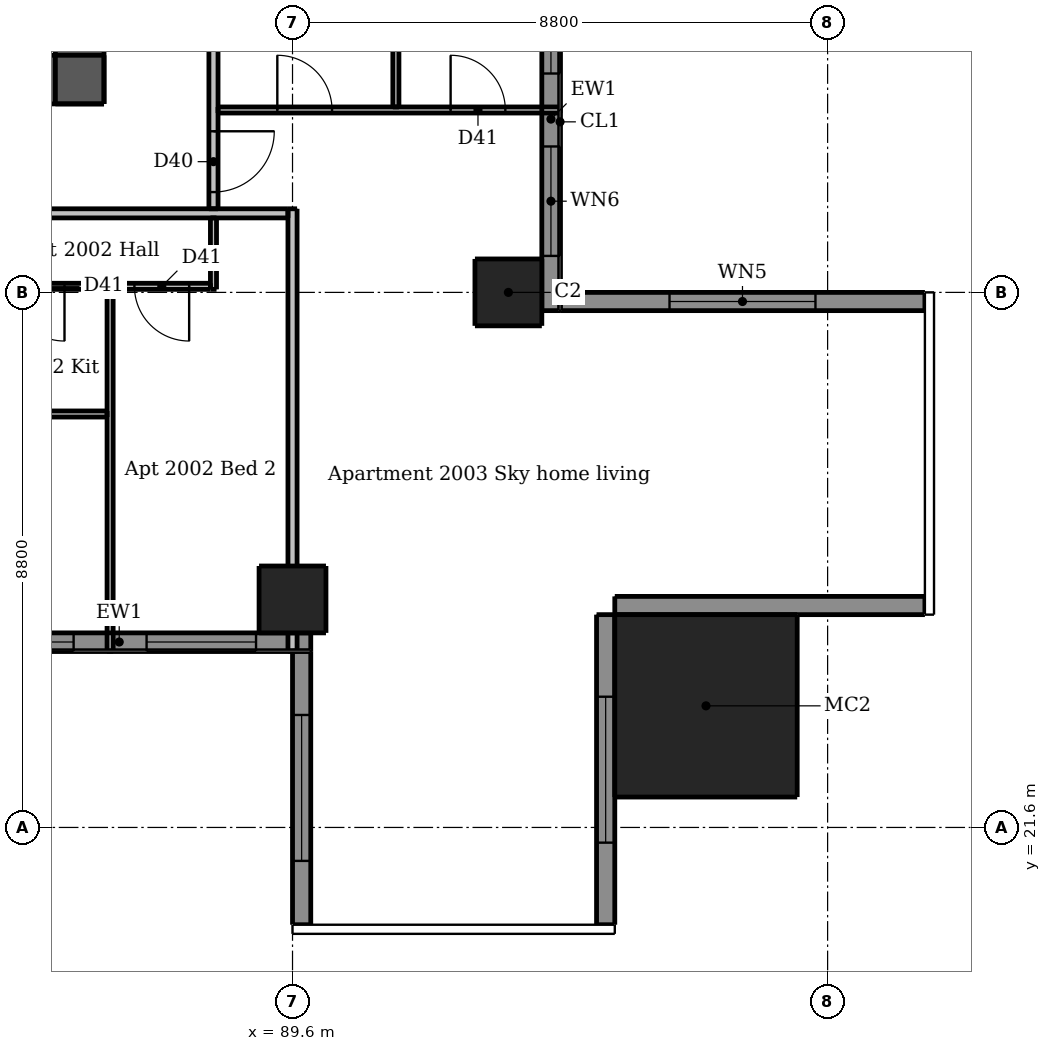
"""IFC4 building model, lengths in metres.
Left out: names, types, materials, properties, quantities, classifications, styles, units other than length and angle.
Written with IfcOpenShell. Run it as: python <this file> out.ifc"""

import sys

from ifc_helpers import new_model, si_unit, direction, frame, frame_2d, origin, origin_2d, place, context, subcontext, project, spatial, rectangle, extrude, element, fill, save


model = new_model("IFC4")
c1 = context("Model", 3, precision=1e-05, world=origin(), true_north=direction((0.0, 1.0)))
c2 = subcontext(c1, "Body", "Model", "MODEL_VIEW")
j1 = project(units=[si_unit("LENGTHUNIT", "METRE"), si_unit("PLANEANGLEUNIT", "RADIAN")], contexts=[c1])
p1 = place(None, origin())
s1 = spatial("IfcSite", under=j1, at=p1, CompositionType="ELEMENT")
p2 = place(p1, origin())
s2 = spatial("IfcBuilding", under=s1, at=p2, CompositionType="ELEMENT")
p3 = place(p2, frame((0.0, 0.0, 78.7)))
s3 = spatial("IfcBuildingStorey", under=s2, at=p3, CompositionType="ELEMENT", Elevation=78.7)
p4 = place(p3, frame((62.5, 33.9, 0.0), z_axis=(0.0, 0.0, 1.0), x_axis=(1.0, 0.0, 0.0)))
e1 = element("IfcWall", 1, at=p4, inside=s3, PredefinedType="SHEAR", context=c2, shape_type="SweptSolid", body=[
    extrude(rectangle(XDim=24.0, YDim=0.8, at=frame_2d((12.0, 0.0))), origin(), (0.0, 0.0, 1.0), 3.05),
])
p5 = place(p4, frame((2.0, 0.0, 0.0)))
e2 = element("IfcOpeningElement", 2, at=p5, cuts=e1, PredefinedType="OPENING", context=c2, shape_type="SweptSolid", body=[
    extrude(rectangle(XDim=1.1, YDim=2.1, at=frame_2d((0.55, 1.05))), frame((0.0, 0.41, 0.0), z_axis=(0.0, -1.0, 0.0), x_axis=(1.0, 0.0, 0.0)), (0.0, 0.0, 1.0), 0.82),
])
p6 = place(p4, frame((20.9, 0.0, 0.0)))
e3 = element("IfcOpeningElement", 3, at=p6, cuts=e1, PredefinedType="OPENING", context=c2, shape_type="SweptSolid", body=[
    extrude(rectangle(XDim=1.1, YDim=2.1, at=frame_2d((0.55, 1.05))), frame((0.0, 0.41, 0.0), z_axis=(0.0, -1.0, 0.0), x_axis=(1.0, 0.0, 0.0)), (0.0, 0.0, 1.0), 0.82),
])
p7 = place(p4, frame((8.0, 0.0, 0.0)))
e4 = element("IfcOpeningElement", 4, at=p7, cuts=e1, PredefinedType="OPENING", context=c2, shape_type="SweptSolid", body=[
    extrude(rectangle(XDim=1.1, YDim=2.1, at=frame_2d((0.55, 1.05))), frame((0.0, 0.41, 0.0), z_axis=(0.0, -1.0, 0.0), x_axis=(1.0, 0.0, 0.0)), (0.0, 0.0, 1.0), 0.82),
])
p8 = place(p4, frame((17.488, 0.0, 0.0)))
e5 = element("IfcOpeningElement", 5, at=p8, cuts=e1, PredefinedType="OPENING", context=c2, shape_type="SweptSolid", body=[
    extrude(rectangle(XDim=0.9, YDim=2.1, at=frame_2d((0.45, 1.05))), frame((0.0, 0.41, 0.0), z_axis=(0.0, -1.0, 0.0), x_axis=(1.0, 0.0, 0.0)), (0.0, 0.0, 1.0), 0.82),
])
p9 = place(p3, frame((86.1, 33.5, 0.0), z_axis=(0.0, 0.0, 1.0), x_axis=(0.0, 1.0, 0.0)))
e6 = element("IfcWall", 6, at=p9, inside=s3, PredefinedType="SHEAR", context=c2, shape_type="SweptSolid", body=[
    extrude(rectangle(XDim=24.0, YDim=0.8, at=frame_2d((12.0, 0.0))), origin(), (0.0, 0.0, 1.0), 3.05),
])
p10 = place(p9, frame((11.2, 0.0, 0.0)))
e7 = element("IfcOpeningElement", 7, at=p10, cuts=e6, PredefinedType="OPENING", context=c2, shape_type="SweptSolid", body=[
    extrude(rectangle(XDim=1.6, YDim=2.1, at=frame_2d((0.8, 1.05))), frame((0.0, 0.41, 0.0), z_axis=(0.0, -1.0, 0.0), x_axis=(1.0, 0.0, 0.0)), (0.0, 0.0, 1.0), 0.82),
])
for number, where, z_axis, x_axis in (
    (8, (89.6, 25.35, 0.0), (0.0, 0.0, 1.0), (1.0, 0.0, 0.0)),
    (9, (93.15, 30.4, 0.0), (0.0, 0.0, 1.0), (1.0, 0.0, 0.0)),
):
    element("IfcColumn", number, at=place(p3, frame(where, z_axis=z_axis, x_axis=x_axis)), inside=s3, PredefinedType="COLUMN", context=c2, shape_type="SweptSolid", body=[
        extrude(rectangle(XDim=1.1, YDim=1.1, at=origin_2d()), origin(), (0.0, 0.0, 1.0), 3.05),
    ])
p11 = place(p3, frame((96.4, 23.6, 0.0), z_axis=(0.0, 0.0, 1.0), x_axis=(1.0, 0.0, 0.0)))
e10 = element("IfcColumn", 10, at=p11, inside=s3, PredefinedType="COLUMN", context=c2, shape_type="SweptSolid", body=[
    extrude(rectangle(XDim=3.0, YDim=3.0, at=origin_2d()), origin(), (0.0, 0.0, 1.0), 3.3),
])
p12 = place(p3, frame((89.75, 24.5, 0.0), z_axis=(0.0, 0.0, 1.0), x_axis=(0.0, -1.0, 0.0)))
e11 = element("IfcWall", 11, at=p12, inside=s3, PredefinedType="SOLIDWALL", context=c2, shape_type="SweptSolid", body=[
    extrude(rectangle(XDim=4.5, YDim=0.3, at=frame_2d((2.25, 0.0))), origin(), (0.0, 0.0, 1.0), 3.05),
])
p13 = place(p12, frame((1.05, 0.0, 0.15)))
e12 = element("IfcOpeningElement", 12, at=p13, cuts=e11, PredefinedType="OPENING", context=c2, shape_type="SweptSolid", body=[
    extrude(rectangle(XDim=2.4, YDim=2.1, at=frame_2d((1.2, 1.05))), frame((0.0, 0.16, 0.0), z_axis=(0.0, -1.0, 0.0), x_axis=(1.0, 0.0, 0.0)), (0.0, 0.0, 1.0), 0.32),
])
p14 = place(p3, frame((94.75, 20.0, 0.0), z_axis=(0.0, 0.0, 1.0), x_axis=(0.0, 1.0, 0.0)))
e13 = element("IfcWall", 13, at=p14, inside=s3, PredefinedType="SOLIDWALL", context=c2, shape_type="SweptSolid", body=[
    extrude(rectangle(XDim=5.1, YDim=0.3, at=frame_2d((2.55, 0.0))), origin(), (0.0, 0.0, 1.0), 3.05),
])
p15 = place(p14, frame((1.35, 0.0, 0.15)))
e14 = element("IfcOpeningElement", 14, at=p15, cuts=e13, PredefinedType="OPENING", context=c2, shape_type="SweptSolid", body=[
    extrude(rectangle(XDim=2.4, YDim=2.1, at=frame_2d((1.2, 1.05))), frame((0.0, 0.16, 0.0), z_axis=(0.0, -1.0, 0.0), x_axis=(1.0, 0.0, 0.0)), (0.0, 0.0, 1.0), 0.32),
])
p16 = place(p3, frame((94.9, 25.25, 0.0), z_axis=(0.0, 0.0, 1.0), x_axis=(1.0, 0.0, 0.0)))
e15 = element("IfcWall", 15, at=p16, inside=s3, PredefinedType="SOLIDWALL", context=c2, shape_type="SweptSolid", body=[
    extrude(rectangle(XDim=5.1, YDim=0.3, at=frame_2d((2.55, 0.0))), origin(), (0.0, 0.0, 1.0), 3.05),
])
p17 = place(p3, frame((100.0, 30.25, 0.0), z_axis=(0.0, 0.0, 1.0), x_axis=(-1.0, 0.0, 0.0)))
e16 = element("IfcWall", 16, at=p17, inside=s3, PredefinedType="SOLIDWALL", context=c2, shape_type="SweptSolid", body=[
    extrude(rectangle(XDim=6.0, YDim=0.3, at=frame_2d((3.0, 0.0))), origin(), (0.0, 0.0, 1.0), 3.05),
])
p18 = place(p17, frame((1.8, 0.0, 0.15)))
e17 = element("IfcOpeningElement", 17, at=p18, cuts=e16, PredefinedType="OPENING", context=c2, shape_type="SweptSolid", body=[
    extrude(rectangle(XDim=2.4, YDim=2.1, at=frame_2d((1.2, 1.05))), frame((0.0, 0.16, 0.0), z_axis=(0.0, -1.0, 0.0), x_axis=(1.0, 0.0, 0.0)), (0.0, 0.0, 1.0), 0.32),
])
p19 = place(p3, frame((83.6, 24.65, 0.0), z_axis=(0.0, 0.0, 1.0), x_axis=(1.0, 0.0, 0.0)))
e18 = element("IfcWall", 18, at=p19, inside=s3, PredefinedType="SOLIDWALL", context=c2, shape_type="SweptSolid", body=[
    extrude(rectangle(XDim=6.3, YDim=0.3, at=frame_2d((3.15, 0.0))), origin(), (0.0, 0.0, 1.0), 3.05),
])
p20 = place(p19, frame((0.6, 0.0, 0.15)))
e19 = element("IfcOpeningElement", 19, at=p20, cuts=e18, PredefinedType="OPENING", context=c2, shape_type="SweptSolid", body=[
    extrude(rectangle(XDim=1.8, YDim=2.1, at=frame_2d((0.9, 1.05))), frame((0.0, 0.16, 0.0), z_axis=(0.0, -1.0, 0.0), x_axis=(1.0, 0.0, 0.0)), (0.0, 0.0, 1.0), 0.32),
])
p21 = place(p19, frame((3.6, 0.0, 0.15)))
e20 = element("IfcOpeningElement", 20, at=p21, cuts=e18, PredefinedType="OPENING", context=c2, shape_type="SweptSolid", body=[
    extrude(rectangle(XDim=1.8, YDim=2.1, at=frame_2d((0.9, 1.05))), frame((0.0, 0.16, 0.0), z_axis=(0.0, -1.0, 0.0), x_axis=(1.0, 0.0, 0.0)), (0.0, 0.0, 1.0), 0.32),
])
p22 = place(p3, frame((93.85, 30.1, 0.0), z_axis=(0.0, 0.0, 1.0), x_axis=(0.0, 1.0, 0.0)))
e21 = element("IfcWall", 21, at=p22, inside=s3, PredefinedType="SOLIDWALL", context=c2, shape_type="SweptSolid", body=[
    extrude(rectangle(XDim=6.3, YDim=0.3, at=frame_2d((3.15, 0.0))), origin(), (0.0, 0.0, 1.0), 3.05),
])
p23 = place(p22, frame((0.9, 0.0, 0.15)))
e22 = element("IfcOpeningElement", 22, at=p23, cuts=e21, PredefinedType="OPENING", context=c2, shape_type="SweptSolid", body=[
    extrude(rectangle(XDim=1.8, YDim=2.1, at=frame_2d((0.9, 1.05))), frame((0.0, 0.16, 0.0), z_axis=(0.0, -1.0, 0.0), x_axis=(1.0, 0.0, 0.0)), (0.0, 0.0, 1.0), 0.32),
])
p24 = place(p22, frame((3.9, 0.0, 0.15)))
e23 = element("IfcOpeningElement", 23, at=p24, cuts=e21, PredefinedType="OPENING", context=c2, shape_type="SweptSolid", body=[
    extrude(rectangle(XDim=1.8, YDim=2.1, at=frame_2d((0.9, 1.05))), frame((0.0, 0.16, 0.0), z_axis=(0.0, -1.0, 0.0), x_axis=(1.0, 0.0, 0.0)), (0.0, 0.0, 1.0), 0.32),
])
p25 = place(p3, frame((86.6, 24.5, 0.0), z_axis=(0.0, 0.0, 1.0), x_axis=(0.0, 1.0, 0.0)))
e24 = element("IfcWall", 24, at=p25, inside=s3, PredefinedType="PARTITIONING", context=c2, shape_type="SweptSolid", body=[
    extrude(rectangle(XDim=5.95, YDim=0.1, at=frame_2d((2.975, 0.0))), origin(), (0.0, 0.0, 1.0), 3.05),
])
p26 = place(p3, frame((88.3, 30.45, 0.0), z_axis=(0.0, 0.0, 1.0), x_axis=(0.0, 1.0, 0.0)))
e25 = element("IfcWall", 25, at=p26, inside=s3, PredefinedType="PARTITIONING", context=c2, shape_type="SweptSolid", body=[
    extrude(rectangle(XDim=1.175, YDim=0.1, at=frame_2d((0.587, 0.0))), origin(), (0.0, 0.0, 1.0), 3.05),
])
p27 = place(p3, frame((91.3, 33.45, 0.0), z_axis=(0.0, 0.0, 1.0), x_axis=(0.0, 1.0, 0.0)))
e26 = element("IfcWall", 26, at=p27, inside=s3, PredefinedType="PARTITIONING", context=c2, shape_type="SweptSolid", body=[
    extrude(rectangle(XDim=5.975, YDim=0.1, at=frame_2d((2.988, 0.0))), origin(), (0.0, 0.0, 1.0), 3.05),
])
p28 = place(p27, frame((3.8, 0.0, 0.0)))
e27 = element("IfcOpeningElement", 27, at=p28, cuts=e26, PredefinedType="OPENING", context=c2, shape_type="SweptSolid", body=[
    extrude(rectangle(XDim=0.8, YDim=2.1, at=frame_2d((0.4, 1.05))), frame((0.0, 0.06, 0.0), z_axis=(0.0, -1.0, 0.0), x_axis=(1.0, 0.0, 0.0)), (0.0, 0.0, 1.0), 0.12),
])
p29 = place(p3, frame((88.375, 33.4, 0.0), z_axis=(0.0, 0.0, 1.0), x_axis=(1.0, 0.0, 0.0)))
e28 = element("IfcWall", 28, at=p29, inside=s3, PredefinedType="PARTITIONING", context=c2, shape_type="SweptSolid", body=[
    extrude(rectangle(XDim=5.625, YDim=0.1, at=frame_2d((2.812, 0.0))), origin(), (0.0, 0.0, 1.0), 3.05),
])
p30 = place(p29, frame((0.975, 0.0, 0.0)))
e29 = element("IfcOpeningElement", 29, at=p30, cuts=e28, PredefinedType="OPENING", context=c2, shape_type="SweptSolid", body=[
    extrude(rectangle(XDim=0.9, YDim=2.1, at=frame_2d((0.45, 1.05))), frame((0.0, 0.06, 0.0), z_axis=(0.0, -1.0, 0.0), x_axis=(1.0, 0.0, 0.0)), (0.0, 0.0, 1.0), 0.12),
])
p31 = place(p29, frame((3.825, 0.0, 0.0)))
e30 = element("IfcOpeningElement", 30, at=p31, cuts=e28, PredefinedType="OPENING", context=c2, shape_type="SweptSolid", body=[
    extrude(rectangle(XDim=0.9, YDim=2.1, at=frame_2d((0.45, 1.05))), frame((0.0, 0.06, 0.0), z_axis=(0.0, -1.0, 0.0), x_axis=(1.0, 0.0, 0.0)), (0.0, 0.0, 1.0), 0.12),
])
p32 = place(p3, frame((88.25, 30.5, 0.0), z_axis=(0.0, 0.0, 1.0), x_axis=(-1.0, 0.0, 0.0)))
e31 = element("IfcWall", 31, at=p32, inside=s3, PredefinedType="PARTITIONING", context=c2, shape_type="SweptSolid", body=[
    extrude(rectangle(XDim=13.475, YDim=0.1, at=frame_2d((6.738, 0.0))), origin(), (0.0, 0.0, 1.0), 3.05),
])
p33 = place(p32, frame((6.3, 0.0, 0.0)))
e32 = element("IfcOpeningElement", 32, at=p33, cuts=e31, PredefinedType="OPENING", context=c2, shape_type="SweptSolid", body=[
    extrude(rectangle(XDim=0.9, YDim=2.1, at=frame_2d((0.45, 1.05))), frame((0.0, 0.06, 0.0), z_axis=(0.0, -1.0, 0.0), x_axis=(1.0, 0.0, 0.0)), (0.0, 0.0, 1.0), 0.12),
])
p34 = place(p32, frame((2.4, 0.0, 0.0)))
e33 = element("IfcOpeningElement", 33, at=p34, cuts=e31, PredefinedType="OPENING", context=c2, shape_type="SweptSolid", body=[
    extrude(rectangle(XDim=0.9, YDim=2.1, at=frame_2d((0.45, 1.05))), frame((0.0, 0.06, 0.0), z_axis=(0.0, -1.0, 0.0), x_axis=(1.0, 0.0, 0.0)), (0.0, 0.0, 1.0), 0.12),
])
p35 = place(p32, frame((4.5, 0.0, 0.0)))
e34 = element("IfcOpeningElement", 34, at=p35, cuts=e31, PredefinedType="OPENING", context=c2, shape_type="SweptSolid", body=[
    extrude(rectangle(XDim=0.9, YDim=2.1, at=frame_2d((0.45, 1.05))), frame((0.0, 0.06, 0.0), z_axis=(0.0, -1.0, 0.0), x_axis=(1.0, 0.0, 0.0)), (0.0, 0.0, 1.0), 0.12),
])
p36 = place(p32, frame((11.35, 0.0, 0.0)))
e35 = element("IfcOpeningElement", 35, at=p36, cuts=e31, PredefinedType="OPENING", context=c2, shape_type="SweptSolid", body=[
    extrude(rectangle(XDim=0.9, YDim=2.1, at=frame_2d((0.45, 1.05))), frame((0.0, 0.06, 0.0), z_axis=(0.0, -1.0, 0.0), x_axis=(1.0, 0.0, 0.0)), (0.0, 0.0, 1.0), 0.12),
])
p37 = place(p32, frame((0.35, 0.0, 0.0)))
e36 = element("IfcOpeningElement", 36, at=p37, cuts=e31, PredefinedType="OPENING", context=c2, shape_type="SweptSolid", body=[
    extrude(rectangle(XDim=0.9, YDim=2.1, at=frame_2d((0.45, 1.05))), frame((0.0, 0.06, 0.0), z_axis=(0.0, -1.0, 0.0), x_axis=(1.0, 0.0, 0.0)), (0.0, 0.0, 1.0), 0.12),
])
p38 = place(p32, frame((8.45, 0.0, 0.0)))
e37 = element("IfcOpeningElement", 37, at=p38, cuts=e31, PredefinedType="OPENING", context=c2, shape_type="SweptSolid", body=[
    extrude(rectangle(XDim=0.8, YDim=2.1, at=frame_2d((0.4, 1.05))), frame((0.0, 0.06, 0.0), z_axis=(0.0, -1.0, 0.0), x_axis=(1.0, 0.0, 0.0)), (0.0, 0.0, 1.0), 0.12),
])
p39 = place(p3, frame((82.45, 28.4, 0.0), z_axis=(0.0, 0.0, 1.0), x_axis=(1.0, 0.0, 0.0)))
e38 = element("IfcWall", 38, at=p39, inside=s3, PredefinedType="PARTITIONING", context=c2, shape_type="SweptSolid", body=[
    extrude(rectangle(XDim=4.1, YDim=0.1, at=frame_2d((2.05, 0.0))), origin(), (0.0, 0.0, 1.0), 3.05),
])
p40 = place(p3, frame((88.3, 60.475, 0.0), z_axis=(0.0, 0.0, 1.0), x_axis=(0.0, -1.0, 0.0)))
e39 = element("IfcWall", 39, at=p40, inside=s3, PredefinedType="PARTITIONING", context=c2, shape_type="SweptSolid", body=[
    extrude(rectangle(XDim=28.7, YDim=0.15, at=frame_2d((14.35, 0.0))), origin(), (0.0, 0.0, 1.0), 3.05),
])
p41 = place(p40, frame((27.425, 0.0, 0.0)))
e40 = element("IfcOpeningElement", 40, at=p41, cuts=e39, PredefinedType="OPENING", context=c2, shape_type="SweptSolid", body=[
    extrude(rectangle(XDim=1.0, YDim=2.1, at=frame_2d((0.5, 1.05))), frame((0.0, 0.085, 0.0), z_axis=(0.0, -1.0, 0.0), x_axis=(1.0, 0.0, 0.0)), (0.0, 0.0, 1.0), 0.17),
])
p42 = place(p40, frame((10.575, 0.0, 0.0)))
e41 = element("IfcOpeningElement", 41, at=p42, cuts=e39, PredefinedType="OPENING", context=c2, shape_type="SweptSolid", body=[
    extrude(rectangle(XDim=1.0, YDim=2.1, at=frame_2d((0.5, 1.05))), frame((0.0, 0.085, 0.0), z_axis=(0.0, -1.0, 0.0), x_axis=(1.0, 0.0, 0.0)), (0.0, 0.0, 1.0), 0.17),
])
p43 = place(p3, frame((89.6, 24.5, 0.0), z_axis=(0.0, 0.0, 1.0), x_axis=(0.0, 1.0, 0.0)))
e42 = element("IfcWall", 42, at=p43, inside=s3, PredefinedType="PARTITIONING", context=c2, shape_type="SweptSolid", body=[
    extrude(rectangle(XDim=7.275, YDim=0.15, at=frame_2d((3.637, 0.0))), origin(), (0.0, 0.0, 1.0), 2.516),
])
p44 = place(p3, frame((89.525, 31.7, 0.0), z_axis=(0.0, 0.0, 1.0), x_axis=(-1.0, 0.0, 0.0)))
e43 = element("IfcWall", 43, at=p44, inside=s3, PredefinedType="PARTITIONING", context=c2, shape_type="SweptSolid", body=[
    extrude(rectangle(XDim=28.75, YDim=0.15, at=frame_2d((14.375, 0.0))), origin(), (0.0, 0.0, 1.0), 3.05),
])
p45 = place(p44, frame((24.625, 0.0, 0.0)))
e44 = element("IfcOpeningElement", 44, at=p45, cuts=e43, PredefinedType="OPENING", context=c2, shape_type="SweptSolid", body=[
    extrude(rectangle(XDim=1.0, YDim=2.1, at=frame_2d((0.5, 1.05))), frame((0.0, 0.085, 0.0), z_axis=(0.0, -1.0, 0.0), x_axis=(1.0, 0.0, 0.0)), (0.0, 0.0, 1.0), 0.17),
])
p46 = place(p44, frame((7.525, 0.0, 0.0)))
e45 = element("IfcOpeningElement", 45, at=p46, cuts=e43, PredefinedType="OPENING", context=c2, shape_type="SweptSolid", body=[
    extrude(rectangle(XDim=1.0, YDim=2.1, at=frame_2d((0.5, 1.05))), frame((0.0, 0.085, 0.0), z_axis=(0.0, -1.0, 0.0), x_axis=(1.0, 0.0, 0.0)), (0.0, 0.0, 1.0), 0.17),
])
p47 = place(p13, origin())
e46 = element("IfcWindow", 46, at=p47, inside=s3, PartitioningType="DOUBLE_PANEL_VERTICAL", PredefinedType="WINDOW", context=c2, shape_type="SweptSolid", body=[
    extrude(rectangle(XDim=2.4, YDim=2.1, at=frame_2d((1.2, 1.05))), frame((0.0, 0.03, 0.0), z_axis=(0.0, -1.0, 0.0), x_axis=(1.0, 0.0, 0.0)), (0.0, 0.0, 1.0), 0.06),
])
fill(e12, e46)
p48 = place(p15, origin())
e47 = element("IfcWindow", 47, at=p48, inside=s3, PartitioningType="DOUBLE_PANEL_VERTICAL", PredefinedType="WINDOW", context=c2, shape_type="SweptSolid", body=[
    extrude(rectangle(XDim=2.4, YDim=2.1, at=frame_2d((1.2, 1.05))), frame((0.0, 0.03, 0.0), z_axis=(0.0, -1.0, 0.0), x_axis=(1.0, 0.0, 0.0)), (0.0, 0.0, 1.0), 0.06),
])
fill(e14, e47)
p49 = place(p18, origin())
e48 = element("IfcWindow", 48, at=p49, inside=s3, PartitioningType="DOUBLE_PANEL_VERTICAL", PredefinedType="WINDOW", context=c2, shape_type="SweptSolid", body=[
    extrude(rectangle(XDim=2.4, YDim=2.1, at=frame_2d((1.2, 1.05))), frame((0.0, 0.03, 0.0), z_axis=(0.0, -1.0, 0.0), x_axis=(1.0, 0.0, 0.0)), (0.0, 0.0, 1.0), 0.06),
])
fill(e17, e48)
p50 = place(p20, origin())
e49 = element("IfcWindow", 49, at=p50, inside=s3, PartitioningType="DOUBLE_PANEL_VERTICAL", PredefinedType="WINDOW", context=c2, shape_type="SweptSolid", body=[
    extrude(rectangle(XDim=1.8, YDim=2.1, at=frame_2d((0.9, 1.05))), frame((0.0, 0.03, 0.0), z_axis=(0.0, -1.0, 0.0), x_axis=(1.0, 0.0, 0.0)), (0.0, 0.0, 1.0), 0.06),
])
fill(e19, e49)
p51 = place(p21, origin())
e50 = element("IfcWindow", 50, at=p51, inside=s3, PartitioningType="DOUBLE_PANEL_VERTICAL", PredefinedType="WINDOW", context=c2, shape_type="SweptSolid", body=[
    extrude(rectangle(XDim=1.8, YDim=2.1, at=frame_2d((0.9, 1.05))), frame((0.0, 0.03, 0.0), z_axis=(0.0, -1.0, 0.0), x_axis=(1.0, 0.0, 0.0)), (0.0, 0.0, 1.0), 0.06),
])
fill(e20, e50)
p52 = place(p23, origin())
e51 = element("IfcWindow", 51, at=p52, inside=s3, PartitioningType="DOUBLE_PANEL_VERTICAL", PredefinedType="WINDOW", context=c2, shape_type="SweptSolid", body=[
    extrude(rectangle(XDim=1.8, YDim=2.1, at=frame_2d((0.9, 1.05))), frame((0.0, 0.03, 0.0), z_axis=(0.0, -1.0, 0.0), x_axis=(1.0, 0.0, 0.0)), (0.0, 0.0, 1.0), 0.06),
])
fill(e22, e51)
p53 = place(p24, origin())
e52 = element("IfcWindow", 52, at=p53, inside=s3, PartitioningType="DOUBLE_PANEL_VERTICAL", PredefinedType="WINDOW", context=c2, shape_type="SweptSolid", body=[
    extrude(rectangle(XDim=1.8, YDim=2.1, at=frame_2d((0.9, 1.05))), frame((0.0, 0.03, 0.0), z_axis=(0.0, -1.0, 0.0), x_axis=(1.0, 0.0, 0.0)), (0.0, 0.0, 1.0), 0.06),
])
fill(e23, e52)
p54 = place(p34, origin())
e53 = element("IfcDoor", 53, at=p54, inside=s3, OperationType="SINGLE_SWING_LEFT", PredefinedType="DOOR", context=c2, shape_type="SweptSolid", body=[
    extrude(rectangle(XDim=0.9, YDim=2.1, at=frame_2d((0.45, 1.05))), frame((0.0, 0.025, 0.0), z_axis=(0.0, -1.0, 0.0), x_axis=(1.0, 0.0, 0.0)), (0.0, 0.0, 1.0), 0.05),
])
fill(e33, e53)
p55 = place(p37, origin())
e54 = element("IfcDoor", 54, at=p55, inside=s3, OperationType="SINGLE_SWING_LEFT", PredefinedType="DOOR", context=c2, shape_type="SweptSolid", body=[
    extrude(rectangle(XDim=0.9, YDim=2.1, at=frame_2d((0.45, 1.05))), frame((0.0, 0.025, 0.0), z_axis=(0.0, -1.0, 0.0), x_axis=(1.0, 0.0, 0.0)), (0.0, 0.0, 1.0), 0.05),
])
fill(e36, e54)
p56 = place(p41, origin())
e55 = element("IfcDoor", 55, at=p56, inside=s3, OperationType="SINGLE_SWING_LEFT", PredefinedType="DOOR", context=c2, shape_type="SweptSolid", body=[
    extrude(rectangle(XDim=1.0, YDim=2.1, at=frame_2d((0.5, 1.05))), frame((0.0, 0.025, 0.0), z_axis=(0.0, -1.0, 0.0), x_axis=(1.0, 0.0, 0.0)), (0.0, 0.0, 1.0), 0.05),
])
fill(e40, e55)
p57 = place(p30, origin())
e56 = element("IfcDoor", 56, at=p57, inside=s3, OperationType="SINGLE_SWING_LEFT", PredefinedType="DOOR", context=c2, shape_type="SweptSolid", body=[
    extrude(rectangle(XDim=0.9, YDim=2.1, at=frame_2d((0.45, 1.05))), frame((0.0, 0.025, 0.0), z_axis=(0.0, -1.0, 0.0), x_axis=(1.0, 0.0, 0.0)), (0.0, 0.0, 1.0), 0.05),
])
fill(e29, e56)
p58 = place(p31, origin())
e57 = element("IfcDoor", 57, at=p58, inside=s3, OperationType="SINGLE_SWING_LEFT", PredefinedType="DOOR", context=c2, shape_type="SweptSolid", body=[
    extrude(rectangle(XDim=0.9, YDim=2.1, at=frame_2d((0.45, 1.05))), frame((0.0, 0.025, 0.0), z_axis=(0.0, -1.0, 0.0), x_axis=(1.0, 0.0, 0.0)), (0.0, 0.0, 1.0), 0.05),
])
fill(e30, e57)
save(model, sys.argv[1])
